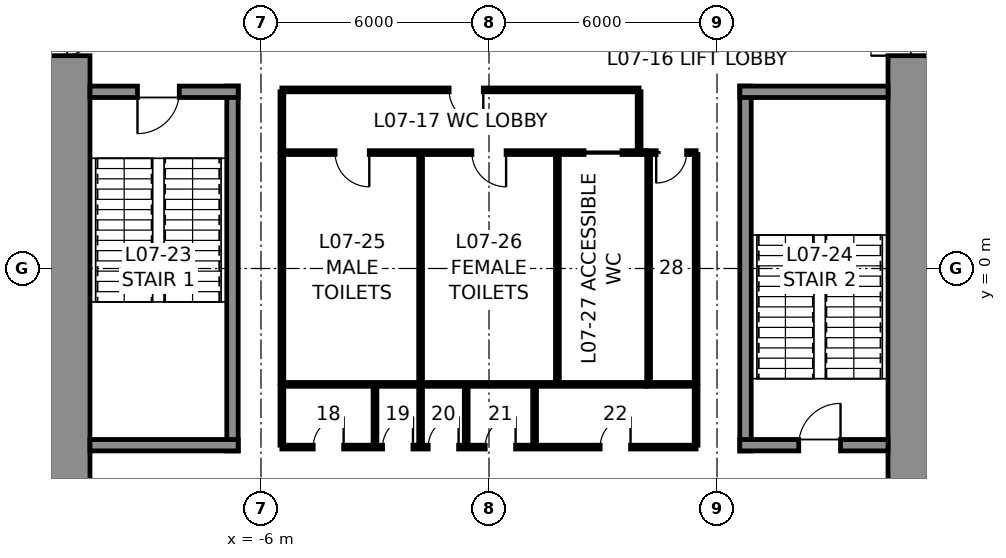
"""IFC4 building model, lengths in metres.
Left out: names, types, materials, properties, quantities, classifications, styles, units other than length and angle.
Written with IfcOpenShell. Run it as: python <this file> out.ifc"""

import sys

from ifc_helpers import new_model, si_unit, direction, frame, frame_2d, origin, place, context, subcontext, project, spatial, rectangle, extrude, element, fill, save


model = new_model("IFC4")
c1 = context("Model", 3, precision=1e-05, world=origin(), true_north=direction((0.0, 1.0)))
c2 = subcontext(c1, "Body", "Model", "MODEL_VIEW")
j1 = project(units=[si_unit("LENGTHUNIT", "METRE"), si_unit("PLANEANGLEUNIT", "RADIAN")], contexts=[c1])
p1 = place(None, origin())
s1 = spatial("IfcSite", under=j1, at=p1, CompositionType="ELEMENT")
p2 = place(p1, origin())
s2 = spatial("IfcBuilding", under=s1, at=p2, CompositionType="ELEMENT")
p3 = place(p2, frame((0.0, 0.0, 37.5)))
s3 = spatial("IfcBuildingStorey", under=s2, at=p3, CompositionType="ELEMENT", Elevation=37.5)
p4 = place(p3, frame((11.25, 10.5, 0.0), z_axis=(0.0, 0.0, 1.0), x_axis=(0.0, -1.0, 0.0)))
e1 = element("IfcWall", 1, at=p4, inside=s3, PredefinedType="SHEAR", context=c2, shape_type="SweptSolid", body=[
    extrude(rectangle(XDim=21.0, YDim=1.5, at=frame_2d((10.5, 0.0))), origin(), (0.0, 0.0, 1.0), 5.5),
])
p5 = place(p4, frame((3.7, 0.0, 0.0)))
e2 = element("IfcOpeningElement", 2, at=p5, cuts=e1, PredefinedType="OPENING", context=c2, shape_type="SweptSolid", body=[
    extrude(rectangle(XDim=1.2, YDim=2.3, at=frame_2d((0.6, 1.15))), frame((0.0, 0.76, 0.0), z_axis=(0.0, -1.0, 0.0), x_axis=(1.0, 0.0, 0.0)), (0.0, 0.0, 1.0), 1.52),
])
p6 = place(p4, frame((16.1, 0.0, 0.0)))
e3 = element("IfcOpeningElement", 3, at=p6, cuts=e1, PredefinedType="OPENING", context=c2, shape_type="SweptSolid", body=[
    extrude(rectangle(XDim=1.2, YDim=2.3, at=frame_2d((0.6, 1.15))), frame((0.0, 0.76, 0.0), z_axis=(0.0, -1.0, 0.0), x_axis=(1.0, 0.0, 0.0)), (0.0, 0.0, 1.0), 1.52),
])
p7 = place(p3, frame((-11.25, -10.5, 0.0), z_axis=(0.0, 0.0, 1.0), x_axis=(0.0, 1.0, 0.0)))
e4 = element("IfcWall", 4, at=p7, inside=s3, PredefinedType="SHEAR", context=c2, shape_type="SweptSolid", body=[
    extrude(rectangle(XDim=21.0, YDim=1.5, at=frame_2d((10.5, 0.0))), origin(), (0.0, 0.0, 1.0), 5.5),
])
p8 = place(p7, frame((16.1, 0.0, 0.0)))
e5 = element("IfcOpeningElement", 5, at=p8, cuts=e4, PredefinedType="OPENING", context=c2, shape_type="SweptSolid", body=[
    extrude(rectangle(XDim=1.2, YDim=2.3, at=frame_2d((0.6, 1.15))), frame((0.0, 0.76, 0.0), z_axis=(0.0, -1.0, 0.0), x_axis=(1.0, 0.0, 0.0)), (0.0, 0.0, 1.0), 1.52),
])
p9 = place(p7, frame((3.7, 0.0, 0.0)))
e6 = element("IfcOpeningElement", 6, at=p9, cuts=e4, PredefinedType="OPENING", context=c2, shape_type="SweptSolid", body=[
    extrude(rectangle(XDim=1.2, YDim=2.3, at=frame_2d((0.6, 1.15))), frame((0.0, 0.76, 0.0), z_axis=(0.0, -1.0, 0.0), x_axis=(1.0, 0.0, 0.0)), (0.0, 0.0, 1.0), 1.52),
])
p10 = place(p3, frame((-6.75, -4.8, 0.0), z_axis=(0.0, 0.0, 1.0), x_axis=(0.0, 1.0, 0.0)))
e7 = element("IfcWall", 7, at=p10, inside=s3, PredefinedType="SOLIDWALL", context=c2, shape_type="SweptSolid", body=[
    extrude(rectangle(XDim=9.6, YDim=0.3, at=frame_2d((4.8, 0.0))), origin(), (0.0, 0.0, 1.0), 5.25),
])
p11 = place(p3, frame((-10.5, 4.65, 0.0), z_axis=(0.0, 0.0, 1.0), x_axis=(1.0, 0.0, 0.0)))
e8 = element("IfcWall", 8, at=p11, inside=s3, PredefinedType="SOLIDWALL", context=c2, shape_type="SweptSolid", body=[
    extrude(rectangle(XDim=3.9, YDim=0.3, at=frame_2d((1.95, 0.0))), origin(), (0.0, 0.0, 1.0), 5.25),
])
p12 = place(p11, frame((1.25, 0.0, 0.0)))
e9 = element("IfcOpeningElement", 9, at=p12, cuts=e8, PredefinedType="OPENING", context=c2, shape_type="SweptSolid", body=[
    extrude(rectangle(XDim=1.1, YDim=2.3, at=frame_2d((0.55, 1.15))), frame((0.0, 0.16, 0.0), z_axis=(0.0, -1.0, 0.0), x_axis=(1.0, 0.0, 0.0)), (0.0, 0.0, 1.0), 0.32),
])
p13 = place(p3, frame((-6.6, -4.65, 0.0), z_axis=(0.0, 0.0, 1.0), x_axis=(-1.0, 0.0, 0.0)))
e10 = element("IfcWall", 10, at=p13, inside=s3, PredefinedType="SOLIDWALL", context=c2, shape_type="SweptSolid", body=[
    extrude(rectangle(XDim=3.9, YDim=0.3, at=frame_2d((1.95, 0.0))), origin(), (0.0, 0.0, 1.0), 5.25),
])
p14 = place(p3, frame((6.75, -4.8, 0.0), z_axis=(0.0, 0.0, 1.0), x_axis=(0.0, 1.0, 0.0)))
e11 = element("IfcWall", 11, at=p14, inside=s3, PredefinedType="SOLIDWALL", context=c2, shape_type="SweptSolid", body=[
    extrude(rectangle(XDim=9.6, YDim=0.3, at=frame_2d((4.8, 0.0))), origin(), (0.0, 0.0, 1.0), 5.25),
])
p15 = place(p3, frame((6.6, 4.65, 0.0), z_axis=(0.0, 0.0, 1.0), x_axis=(1.0, 0.0, 0.0)))
e12 = element("IfcWall", 12, at=p15, inside=s3, PredefinedType="SOLIDWALL", context=c2, shape_type="SweptSolid", body=[
    extrude(rectangle(XDim=3.9, YDim=0.3, at=frame_2d((1.95, 0.0))), origin(), (0.0, 0.0, 1.0), 5.25),
])
p16 = place(p3, frame((10.5, -4.65, 0.0), z_axis=(0.0, 0.0, 1.0), x_axis=(-1.0, 0.0, 0.0)))
e13 = element("IfcWall", 13, at=p16, inside=s3, PredefinedType="SOLIDWALL", context=c2, shape_type="SweptSolid", body=[
    extrude(rectangle(XDim=3.9, YDim=0.3, at=frame_2d((1.95, 0.0))), origin(), (0.0, 0.0, 1.0), 5.25),
])
p17 = place(p16, frame((1.25, 0.0, 0.0)))
e14 = element("IfcOpeningElement", 14, at=p17, cuts=e13, PredefinedType="OPENING", context=c2, shape_type="SweptSolid", body=[
    extrude(rectangle(XDim=1.1, YDim=2.3, at=frame_2d((0.55, 1.15))), frame((0.0, 0.16, 0.0), z_axis=(0.0, -1.0, 0.0), x_axis=(1.0, 0.0, 0.0)), (0.0, 0.0, 1.0), 0.32),
])
p18 = place(p3, frame((-5.45, 3.05, 0.0), z_axis=(0.0, 0.0, 1.0), x_axis=(1.0, 0.0, 0.0)))
e15 = element("IfcWall", 15, at=p18, inside=s3, PredefinedType="PARTITIONING", context=c2, shape_type="SweptSolid", body=[
    extrude(rectangle(XDim=9.6, YDim=0.1, at=frame_2d((4.8, 0.0))), origin(), (0.0, 0.0, 1.0), 5.25),
])
p19 = place(p18, frame((1.4, 0.0, 0.0)))
e16 = element("IfcOpeningElement", 16, at=p19, cuts=e15, PredefinedType="OPENING", context=c2, shape_type="SweptSolid", body=[
    extrude(rectangle(XDim=0.9, YDim=2.3, at=frame_2d((0.45, 1.15))), frame((0.0, 0.06, 0.0), z_axis=(0.0, -1.0, 0.0), x_axis=(1.0, 0.0, 0.0)), (0.0, 0.0, 1.0), 0.12),
])
p20 = place(p18, frame((5.0, 0.0, 0.0)))
e17 = element("IfcOpeningElement", 17, at=p20, cuts=e15, PredefinedType="OPENING", context=c2, shape_type="SweptSolid", body=[
    extrude(rectangle(XDim=0.9, YDim=2.3, at=frame_2d((0.45, 1.15))), frame((0.0, 0.06, 0.0), z_axis=(0.0, -1.0, 0.0), x_axis=(1.0, 0.0, 0.0)), (0.0, 0.0, 1.0), 0.12),
])
p21 = place(p18, frame((7.95, 0.0, 0.0)))
e18 = element("IfcOpeningElement", 18, at=p21, cuts=e15, PredefinedType="OPENING", context=c2, shape_type="SweptSolid", body=[
    extrude(rectangle(XDim=1.0, YDim=2.3, at=frame_2d((0.5, 1.15))), frame((0.0, 0.06, 0.0), z_axis=(0.0, -1.0, 0.0), x_axis=(1.0, 0.0, 0.0)), (0.0, 0.0, 1.0), 0.12),
])
p22 = place(p3, frame((4.15, 3.05, 0.0), z_axis=(0.0, 0.0, 1.0), x_axis=(1.0, 0.0, 0.0)))
e19 = element("IfcWall", 19, at=p22, inside=s3, PredefinedType="PARTITIONING", context=c2, shape_type="SweptSolid", body=[
    extrude(rectangle(XDim=1.3, YDim=0.1, at=frame_2d((0.65, 0.0))), origin(), (0.0, 0.0, 1.0), 5.25),
])
p23 = place(p22, frame((0.25, 0.0, 0.0)))
e20 = element("IfcOpeningElement", 20, at=p23, cuts=e19, PredefinedType="OPENING", context=c2, shape_type="SweptSolid", body=[
    extrude(rectangle(XDim=0.8, YDim=2.3, at=frame_2d((0.4, 1.15))), frame((0.0, 0.06, 0.0), z_axis=(0.0, -1.0, 0.0), x_axis=(1.0, 0.0, 0.0)), (0.0, 0.0, 1.0), 0.12),
])
p24 = place(p3, frame((4.15, -3.05, 0.0), z_axis=(0.0, 0.0, 1.0), x_axis=(-1.0, 0.0, 0.0)))
e21 = element("IfcWall", 21, at=p24, inside=s3, PredefinedType="PARTITIONING", context=c2, shape_type="SweptSolid", body=[
    extrude(rectangle(XDim=9.6, YDim=0.1, at=frame_2d((4.8, 0.0))), origin(), (0.0, 0.0, 1.0), 5.25),
])
p25 = place(p3, frame((5.45, -3.05, 0.0), z_axis=(0.0, 0.0, 1.0), x_axis=(-1.0, 0.0, 0.0)))
e22 = element("IfcWall", 22, at=p25, inside=s3, PredefinedType="PARTITIONING", context=c2, shape_type="SweptSolid", body=[
    extrude(rectangle(XDim=1.3, YDim=0.1, at=frame_2d((0.65, 0.0))), origin(), (0.0, 0.0, 1.0), 5.25),
])
for number, where, z_axis, x_axis in (
    (23, (5.45, 3.0, 0.0), (0.0, 0.0, 1.0), (0.0, -1.0, 0.0)),
    (24, (-5.45, -3.0, 0.0), (0.0, 0.0, 1.0), (0.0, 1.0, 0.0)),
    (25, (-1.8, -3.0, 0.0), (0.0, 0.0, 1.0), (0.0, 1.0, 0.0)),
    (26, (1.8, -3.0, 0.0), (0.0, 0.0, 1.0), (0.0, 1.0, 0.0)),
    (27, (4.2, -3.0, 0.0), (0.0, 0.0, 1.0), (0.0, 1.0, 0.0)),
):
    element("IfcWall", number, at=place(p3, frame(where, z_axis=z_axis, x_axis=x_axis)), inside=s3, PredefinedType="PARTITIONING", context=c2, shape_type="SweptSolid", body=[
        extrude(rectangle(XDim=6.0, YDim=0.1, at=frame_2d((3.0, 0.0))), origin(), (0.0, 0.0, 1.0), 5.25),
    ])
p26 = place(p3, frame((-5.45, 4.7, 0.0), z_axis=(0.0, 0.0, 1.0), x_axis=(1.0, 0.0, 0.0)))
e28 = element("IfcWall", 28, at=p26, inside=s3, PredefinedType="PARTITIONING", context=c2, shape_type="SweptSolid", body=[
    extrude(rectangle(XDim=9.4, YDim=0.1, at=frame_2d((4.7, 0.0))), origin(), (0.0, 0.0, 1.0), 5.25),
])
p27 = place(p26, frame((4.4, 0.0, 0.0)))
e29 = element("IfcOpeningElement", 29, at=p27, cuts=e28, PredefinedType="OPENING", context=c2, shape_type="SweptSolid", body=[
    extrude(rectangle(XDim=0.9, YDim=2.3, at=frame_2d((0.45, 1.15))), frame((0.0, 0.06, 0.0), z_axis=(0.0, -1.0, 0.0), x_axis=(1.0, 0.0, 0.0)), (0.0, 0.0, 1.0), 0.12),
])
for number, where, z_axis, x_axis in (
    (30, (-5.45, 3.1, 0.0), (0.0, 0.0, 1.0), (0.0, 1.0, 0.0)),
    (31, (3.95, 3.1, 0.0), (0.0, 0.0, 1.0), (0.0, 1.0, 0.0)),
):
    element("IfcWall", number, at=place(p3, frame(where, z_axis=z_axis, x_axis=x_axis)), inside=s3, PredefinedType="PARTITIONING", context=c2, shape_type="SweptSolid", body=[
        extrude(rectangle(XDim=1.55, YDim=0.1, at=frame_2d((0.775, 0.0))), origin(), (0.0, 0.0, 1.0), 5.25),
    ])
p28 = place(p3, frame((5.45, -4.7, 0.0), z_axis=(0.0, 0.0, 1.0), x_axis=(-1.0, 0.0, 0.0)))
e32 = element("IfcWall", 32, at=p28, inside=s3, PredefinedType="PARTITIONING", context=c2, shape_type="SweptSolid", body=[
    extrude(rectangle(XDim=10.9, YDim=0.1, at=frame_2d((5.45, 0.0))), origin(), (0.0, 0.0, 1.0), 5.25),
])
p29 = place(p28, frame((9.275, 0.0, 0.0)))
e33 = element("IfcOpeningElement", 33, at=p29, cuts=e32, PredefinedType="OPENING", context=c2, shape_type="SweptSolid", body=[
    extrude(rectangle(XDim=0.8, YDim=2.3, at=frame_2d((0.4, 1.15))), frame((0.0, 0.06, 0.0), z_axis=(0.0, -1.0, 0.0), x_axis=(1.0, 0.0, 0.0)), (0.0, 0.0, 1.0), 0.12),
])
p30 = place(p28, frame((7.45, 0.0, 0.0)))
e34 = element("IfcOpeningElement", 34, at=p30, cuts=e32, PredefinedType="OPENING", context=c2, shape_type="SweptSolid", body=[
    extrude(rectangle(XDim=0.8, YDim=2.3, at=frame_2d((0.4, 1.15))), frame((0.0, 0.06, 0.0), z_axis=(0.0, -1.0, 0.0), x_axis=(1.0, 0.0, 0.0)), (0.0, 0.0, 1.0), 0.12),
])
p31 = place(p28, frame((6.25, 0.0, 0.0)))
e35 = element("IfcOpeningElement", 35, at=p31, cuts=e32, PredefinedType="OPENING", context=c2, shape_type="SweptSolid", body=[
    extrude(rectangle(XDim=0.8, YDim=2.3, at=frame_2d((0.4, 1.15))), frame((0.0, 0.06, 0.0), z_axis=(0.0, -1.0, 0.0), x_axis=(1.0, 0.0, 0.0)), (0.0, 0.0, 1.0), 0.12),
])
p32 = place(p28, frame((4.75, 0.0, 0.0)))
e36 = element("IfcOpeningElement", 36, at=p32, cuts=e32, PredefinedType="OPENING", context=c2, shape_type="SweptSolid", body=[
    extrude(rectangle(XDim=0.8, YDim=2.3, at=frame_2d((0.4, 1.15))), frame((0.0, 0.06, 0.0), z_axis=(0.0, -1.0, 0.0), x_axis=(1.0, 0.0, 0.0)), (0.0, 0.0, 1.0), 0.12),
])
p33 = place(p28, frame((1.725, 0.0, 0.0)))
e37 = element("IfcOpeningElement", 37, at=p33, cuts=e32, PredefinedType="OPENING", context=c2, shape_type="SweptSolid", body=[
    extrude(rectangle(XDim=0.8, YDim=2.3, at=frame_2d((0.4, 1.15))), frame((0.0, 0.06, 0.0), z_axis=(0.0, -1.0, 0.0), x_axis=(1.0, 0.0, 0.0)), (0.0, 0.0, 1.0), 0.12),
])
for number, where, z_axis, x_axis in (
    (38, (-5.45, -3.1, 0.0), (0.0, 0.0, 1.0), (0.0, -1.0, 0.0)),
    (39, (5.45, -3.1, 0.0), (0.0, 0.0, 1.0), (0.0, -1.0, 0.0)),
    (40, (-3.0, -3.1, 0.0), (0.0, 0.0, 1.0), (0.0, -1.0, 0.0)),
    (41, (-1.8, -3.1, 0.0), (0.0, 0.0, 1.0), (0.0, -1.0, 0.0)),
    (42, (-0.6, -3.1, 0.0), (0.0, 0.0, 1.0), (0.0, -1.0, 0.0)),
    (43, (1.2, -3.1, 0.0), (0.0, 0.0, 1.0), (0.0, -1.0, 0.0)),
):
    element("IfcWall", number, at=place(p3, frame(where, z_axis=z_axis, x_axis=x_axis)), inside=s3, PredefinedType="PARTITIONING", context=c2, shape_type="SweptSolid", body=[
        extrude(rectangle(XDim=1.55, YDim=0.1, at=frame_2d((0.775, 0.0))), origin(), (0.0, 0.0, 1.0), 5.25),
    ])
p34 = place(p12, frame((1.1, 0.0, 0.0), z_axis=(0.0, 0.0, 1.0), x_axis=(-1.0, 0.0, 0.0)))
e44 = element("IfcDoor", 44, at=p34, inside=s3, OperationType="SINGLE_SWING_RIGHT", PredefinedType="DOOR", context=c2, shape_type="SweptSolid", body=[
    extrude(rectangle(XDim=1.1, YDim=2.3, at=frame_2d((0.55, 1.15))), frame((0.0, 0.025, 0.0), z_axis=(0.0, -1.0, 0.0), x_axis=(1.0, 0.0, 0.0)), (0.0, 0.0, 1.0), 0.05),
])
fill(e9, e44)
p35 = place(p17, frame((1.1, 0.0, 0.0), z_axis=(0.0, 0.0, 1.0), x_axis=(-1.0, 0.0, 0.0)))
e45 = element("IfcDoor", 45, at=p35, inside=s3, OperationType="SINGLE_SWING_RIGHT", PredefinedType="DOOR", context=c2, shape_type="SweptSolid", body=[
    extrude(rectangle(XDim=1.1, YDim=2.3, at=frame_2d((0.55, 1.15))), frame((0.0, 0.025, 0.0), z_axis=(0.0, -1.0, 0.0), x_axis=(1.0, 0.0, 0.0)), (0.0, 0.0, 1.0), 0.05),
])
fill(e14, e45)
p36 = place(p19, frame((0.9, 0.0, 0.0), z_axis=(0.0, 0.0, 1.0), x_axis=(-1.0, 0.0, 0.0)))
e46 = element("IfcDoor", 46, at=p36, inside=s3, OperationType="SINGLE_SWING_LEFT", PredefinedType="DOOR", context=c2, shape_type="SweptSolid", body=[
    extrude(rectangle(XDim=0.9, YDim=2.3, at=frame_2d((0.45, 1.15))), frame((0.0, 0.025, 0.0), z_axis=(0.0, -1.0, 0.0), x_axis=(1.0, 0.0, 0.0)), (0.0, 0.0, 1.0), 0.05),
])
fill(e16, e46)
p37 = place(p20, frame((0.9, 0.0, 0.0), z_axis=(0.0, 0.0, 1.0), x_axis=(-1.0, 0.0, 0.0)))
e47 = element("IfcDoor", 47, at=p37, inside=s3, OperationType="SINGLE_SWING_LEFT", PredefinedType="DOOR", context=c2, shape_type="SweptSolid", body=[
    extrude(rectangle(XDim=0.9, YDim=2.3, at=frame_2d((0.45, 1.15))), frame((0.0, 0.025, 0.0), z_axis=(0.0, -1.0, 0.0), x_axis=(1.0, 0.0, 0.0)), (0.0, 0.0, 1.0), 0.05),
])
fill(e17, e47)
p38 = place(p21, frame((1.0, 0.0, 0.0), z_axis=(0.0, 0.0, 1.0), x_axis=(-1.0, 0.0, 0.0)))
e48 = element("IfcDoor", 48, at=p38, inside=s3, OperationType="SLIDING_TO_LEFT", PredefinedType="DOOR", context=c2, shape_type="SweptSolid", body=[
    extrude(rectangle(XDim=1.0, YDim=2.3, at=frame_2d((0.5, 1.15))), frame((0.0, 0.025, 0.0), z_axis=(0.0, -1.0, 0.0), x_axis=(1.0, 0.0, 0.0)), (0.0, 0.0, 1.0), 0.05),
])
fill(e18, e48)
p39 = place(p23, frame((0.8, 0.0, 0.0), z_axis=(0.0, 0.0, 1.0), x_axis=(-1.0, 0.0, 0.0)))
e49 = element("IfcDoor", 49, at=p39, inside=s3, OperationType="SINGLE_SWING_RIGHT", PredefinedType="DOOR", context=c2, shape_type="SweptSolid", body=[
    extrude(rectangle(XDim=0.8, YDim=2.3, at=frame_2d((0.4, 1.15))), frame((0.0, 0.025, 0.0), z_axis=(0.0, -1.0, 0.0), x_axis=(1.0, 0.0, 0.0)), (0.0, 0.0, 1.0), 0.05),
])
fill(e20, e49)
p40 = place(p27, frame((0.9, 0.0, 0.0), z_axis=(0.0, 0.0, 1.0), x_axis=(-1.0, 0.0, 0.0)))
e50 = element("IfcDoor", 50, at=p40, inside=s3, OperationType="SINGLE_SWING_LEFT", PredefinedType="DOOR", context=c2, shape_type="SweptSolid", body=[
    extrude(rectangle(XDim=0.9, YDim=2.3, at=frame_2d((0.45, 1.15))), frame((0.0, 0.025, 0.0), z_axis=(0.0, -1.0, 0.0), x_axis=(1.0, 0.0, 0.0)), (0.0, 0.0, 1.0), 0.05),
])
fill(e29, e50)
p41 = place(p29, frame((0.8, 0.0, 0.0), z_axis=(0.0, 0.0, 1.0), x_axis=(-1.0, 0.0, 0.0)))
e51 = element("IfcDoor", 51, at=p41, inside=s3, OperationType="SINGLE_SWING_RIGHT", PredefinedType="DOOR", context=c2, shape_type="SweptSolid", body=[
    extrude(rectangle(XDim=0.8, YDim=2.3, at=frame_2d((0.4, 1.15))), frame((0.0, 0.025, 0.0), z_axis=(0.0, -1.0, 0.0), x_axis=(1.0, 0.0, 0.0)), (0.0, 0.0, 1.0), 0.05),
])
fill(e33, e51)
p42 = place(p30, frame((0.8, 0.0, 0.0), z_axis=(0.0, 0.0, 1.0), x_axis=(-1.0, 0.0, 0.0)))
e52 = element("IfcDoor", 52, at=p42, inside=s3, OperationType="SINGLE_SWING_RIGHT", PredefinedType="DOOR", context=c2, shape_type="SweptSolid", body=[
    extrude(rectangle(XDim=0.8, YDim=2.3, at=frame_2d((0.4, 1.15))), frame((0.0, 0.025, 0.0), z_axis=(0.0, -1.0, 0.0), x_axis=(1.0, 0.0, 0.0)), (0.0, 0.0, 1.0), 0.05),
])
fill(e34, e52)
p43 = place(p31, frame((0.8, 0.0, 0.0), z_axis=(0.0, 0.0, 1.0), x_axis=(-1.0, 0.0, 0.0)))
e53 = element("IfcDoor", 53, at=p43, inside=s3, OperationType="SINGLE_SWING_RIGHT", PredefinedType="DOOR", context=c2, shape_type="SweptSolid", body=[
    extrude(rectangle(XDim=0.8, YDim=2.3, at=frame_2d((0.4, 1.15))), frame((0.0, 0.025, 0.0), z_axis=(0.0, -1.0, 0.0), x_axis=(1.0, 0.0, 0.0)), (0.0, 0.0, 1.0), 0.05),
])
fill(e35, e53)
p44 = place(p32, frame((0.8, 0.0, 0.0), z_axis=(0.0, 0.0, 1.0), x_axis=(-1.0, 0.0, 0.0)))
e54 = element("IfcDoor", 54, at=p44, inside=s3, OperationType="SINGLE_SWING_RIGHT", PredefinedType="DOOR", context=c2, shape_type="SweptSolid", body=[
    extrude(rectangle(XDim=0.8, YDim=2.3, at=frame_2d((0.4, 1.15))), frame((0.0, 0.025, 0.0), z_axis=(0.0, -1.0, 0.0), x_axis=(1.0, 0.0, 0.0)), (0.0, 0.0, 1.0), 0.05),
])
fill(e36, e54)
p45 = place(p33, frame((0.8, 0.0, 0.0), z_axis=(0.0, 0.0, 1.0), x_axis=(-1.0, 0.0, 0.0)))
e55 = element("IfcDoor", 55, at=p45, inside=s3, OperationType="SINGLE_SWING_RIGHT", PredefinedType="DOOR", context=c2, shape_type="SweptSolid", body=[
    extrude(rectangle(XDim=0.8, YDim=2.3, at=frame_2d((0.4, 1.15))), frame((0.0, 0.025, 0.0), z_axis=(0.0, -1.0, 0.0), x_axis=(1.0, 0.0, 0.0)), (0.0, 0.0, 1.0), 0.05),
])
fill(e37, e55)
p46 = place(p8, frame((1.2, 0.0, 0.0), z_axis=(0.0, 0.0, 1.0), x_axis=(-1.0, 0.0, 0.0)))
e56 = element("IfcDoor", 56, at=p46, inside=s3, OperationType="SINGLE_SWING_LEFT", PredefinedType="DOOR", context=c2, shape_type="SweptSolid", body=[
    extrude(rectangle(XDim=1.2, YDim=2.3, at=frame_2d((0.6, 1.15))), frame((0.0, 0.025, 0.0), z_axis=(0.0, -1.0, 0.0), x_axis=(1.0, 0.0, 0.0)), (0.0, 0.0, 1.0), 0.05),
])
fill(e5, e56)
p47 = place(p5, frame((1.2, 0.0, 0.0), z_axis=(0.0, 0.0, 1.0), x_axis=(-1.0, 0.0, 0.0)))
e57 = element("IfcDoor", 57, at=p47, inside=s3, OperationType="SINGLE_SWING_LEFT", PredefinedType="DOOR", context=c2, shape_type="SweptSolid", body=[
    extrude(rectangle(XDim=1.2, YDim=2.3, at=frame_2d((0.6, 1.15))), frame((0.0, 0.025, 0.0), z_axis=(0.0, -1.0, 0.0), x_axis=(1.0, 0.0, 0.0)), (0.0, 0.0, 1.0), 0.05),
])
fill(e2, e57)
save(model, sys.argv[1])
